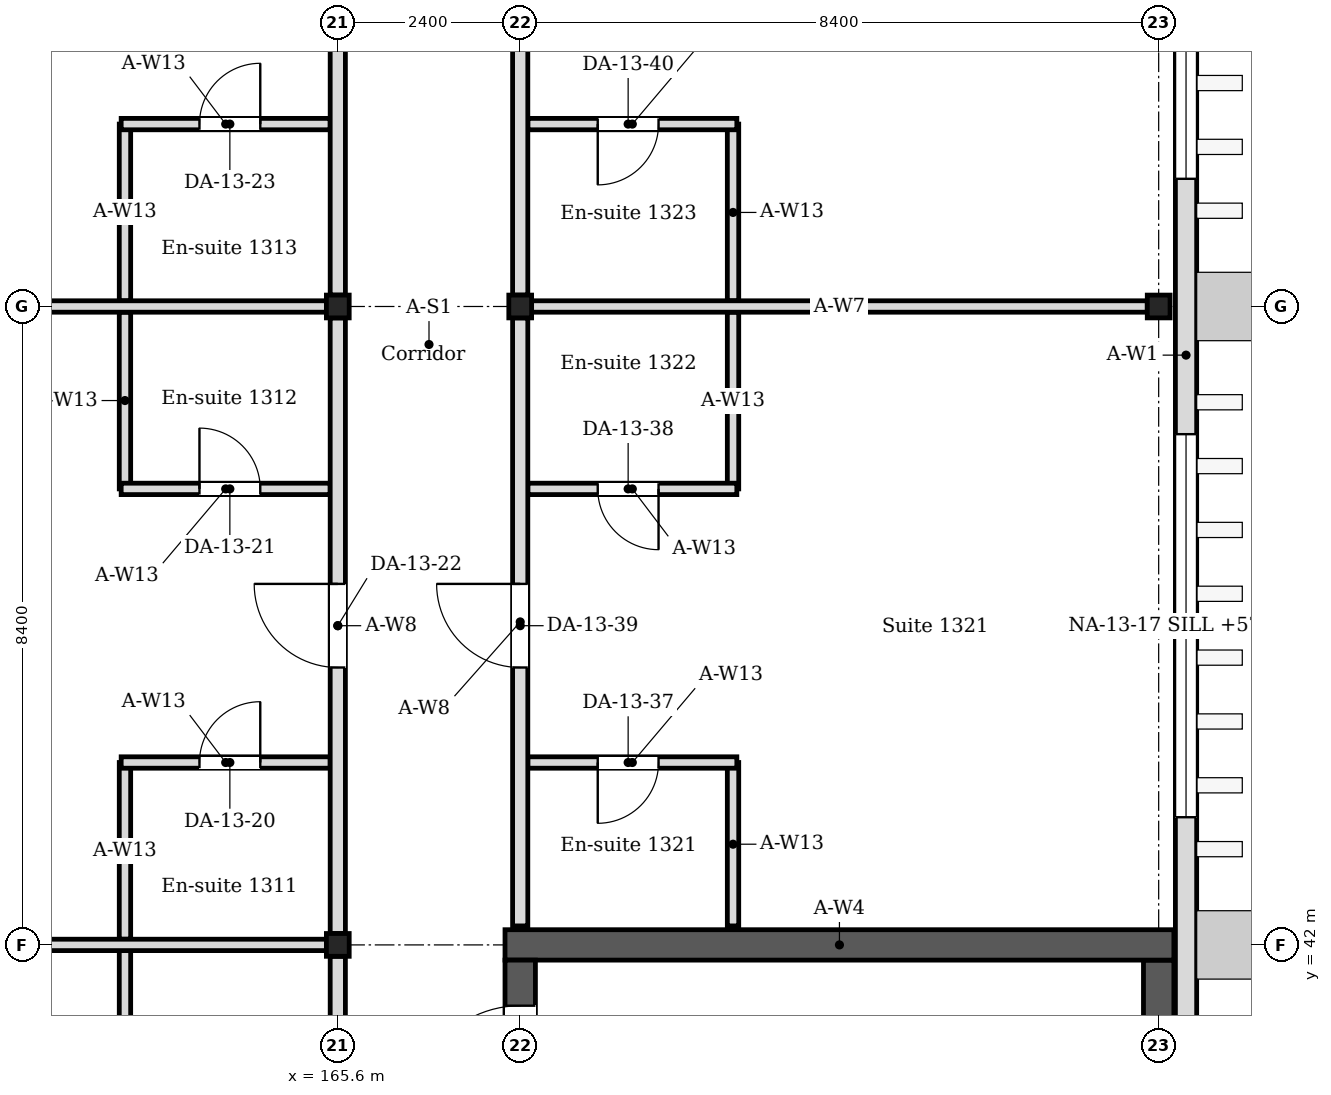
"""IFC4 building model, lengths in metres.
Left out: names, types, materials, properties, quantities, classifications, styles, units other than length and angle.
Written with IfcOpenShell. Run it as: python <this file> out.ifc"""

import sys

from ifc_helpers import new_model, si_unit, direction, frame, frame_2d, origin, origin_2d, place, context, subcontext, project, spatial, rectangle, i_section, extrude, element, fill, save


model = new_model("IFC4")
c1 = context("Model", 3, precision=1e-05, world=origin(), true_north=direction((0.0, 1.0)))
c2 = subcontext(c1, "Body", "Model", "MODEL_VIEW")
j1 = project(units=[si_unit("LENGTHUNIT", "METRE"), si_unit("PLANEANGLEUNIT", "RADIAN")], contexts=[c1])
p1 = place(None, origin())
s1 = spatial("IfcSite", under=j1, at=p1, CompositionType="ELEMENT")
p2 = place(p1, origin())
s2 = spatial("IfcBuilding", under=s1, at=p2, CompositionType="ELEMENT")
p3 = place(p2, frame((0.0, 0.0, 56.4)))
s3 = spatial("IfcBuildingStorey", under=s2, at=p3, CompositionType="ELEMENT", Elevation=56.4)
for number, where, z_axis, x_axis in (
    (1, (165.6, 42.0, 0.0), (0.0, 0.0, 1.0), (1.0, 0.0, 0.0)),
    (2, (165.6, 50.4, 0.0), (0.0, 0.0, 1.0), (1.0, 0.0, 0.0)),
    (3, (168.0, 50.4, 0.0), (0.0, 0.0, 1.0), (1.0, 0.0, 0.0)),
    (4, (176.4, 50.4, 0.0), (0.0, 0.0, 1.0), (1.0, 0.0, 0.0)),
):
    element("IfcColumn", number, at=place(p3, frame(where, z_axis=z_axis, x_axis=x_axis)), inside=s3, PredefinedType="COLUMN", context=c2, shape_type="SweptSolid", body=[
        extrude(i_section(OverallWidth=0.3, OverallDepth=0.3, WebThickness=0.01, FlangeThickness=0.015, FilletRadius=0.013, at=origin_2d()), origin(), (0.0, 0.0, 1.0), 4.2),
    ])
p4 = place(p3, frame((167.8, 42.0, 0.0), z_axis=(0.0, 0.0, 1.0), x_axis=(1.0, 0.0, 0.0)))
e5 = element("IfcWall", 5, at=p4, inside=s3, PredefinedType="SOLIDWALL", context=c2, shape_type="SweptSolid", body=[
    extrude(rectangle(XDim=8.8, YDim=0.4, at=frame_2d((4.4, 0.0))), origin(), (0.0, 0.0, 1.0), 4.05),
])
p5 = place(p3, frame((168.0, 25.4, 0.0), z_axis=(0.0, 0.0, 1.0), x_axis=(0.0, 1.0, 0.0)))
e6 = element("IfcWall", 6, at=p5, inside=s3, PredefinedType="SOLIDWALL", context=c2, shape_type="SweptSolid", body=[
    extrude(rectangle(XDim=16.4, YDim=0.4, at=frame_2d((8.2, 0.0))), origin(), (0.0, 0.0, 1.0), 4.05),
])
p6 = place(p5, frame((1.0, 0.0, 0.0)))
e7 = element("IfcOpeningElement", 7, at=p6, cuts=e6, PredefinedType="OPENING", context=c2, shape_type="SweptSolid", body=[
    extrude(rectangle(XDim=1.0, YDim=2.1, at=frame_2d((0.5, 1.05))), frame((0.0, 0.21, 0.0), z_axis=(0.0, -1.0, 0.0), x_axis=(1.0, 0.0, 0.0)), (0.0, 0.0, 1.0), 0.42),
])
p7 = place(p5, frame((14.4, 0.0, 0.0)))
e8 = element("IfcOpeningElement", 8, at=p7, cuts=e6, PredefinedType="OPENING", context=c2, shape_type="SweptSolid", body=[
    extrude(rectangle(XDim=1.4, YDim=2.1, at=frame_2d((0.7, 1.05))), frame((0.0, 0.21, 0.0), z_axis=(0.0, -1.0, 0.0), x_axis=(1.0, 0.0, 0.0)), (0.0, 0.0, 1.0), 0.42),
])
p8 = place(p3, frame((176.4, 25.4, 0.0), z_axis=(0.0, 0.0, 1.0), x_axis=(0.0, 1.0, 0.0)))
e9 = element("IfcWall", 9, at=p8, inside=s3, PredefinedType="SOLIDWALL", context=c2, shape_type="SweptSolid", body=[
    extrude(rectangle(XDim=16.4, YDim=0.4, at=frame_2d((8.2, 0.0))), origin(), (0.0, 0.0, 1.0), 4.05),
])
p9 = place(p3, frame((176.76, 24.85, 0.0), z_axis=(0.0, 0.0, 1.0), x_axis=(0.0, 1.0, 0.0)))
e10 = element("IfcWall", 10, at=p9, inside=s3, PredefinedType="SOLIDWALL", context=c2, shape_type="SweptSolid", body=[
    extrude(rectangle(XDim=42.57, YDim=0.28, at=frame_2d((21.285, 0.0))), origin(), (0.0, 0.0, 1.0), 4.05),
])
p10 = place(p9, frame((18.83, 0.0, 0.6)))
e11 = element("IfcOpeningElement", 11, at=p10, cuts=e10, PredefinedType="OPENING", context=c2, shape_type="SweptSolid", body=[
    extrude(rectangle(XDim=5.04, YDim=2.4, at=frame_2d((2.52, 1.2))), frame((0.0, 0.15, 0.0), z_axis=(0.0, -1.0, 0.0), x_axis=(1.0, 0.0, 0.0)), (0.0, 0.0, 1.0), 0.3),
])
p11 = place(p9, frame((27.23, 0.0, 0.6)))
e12 = element("IfcOpeningElement", 12, at=p11, cuts=e10, PredefinedType="OPENING", context=c2, shape_type="SweptSolid", body=[
    extrude(rectangle(XDim=5.04, YDim=2.4, at=frame_2d((2.52, 1.2))), frame((0.0, 0.15, 0.0), z_axis=(0.0, -1.0, 0.0), x_axis=(1.0, 0.0, 0.0)), (0.0, 0.0, 1.0), 0.3),
])
for number, where, z_axis, x_axis in (
    (13, (162.8, 39.6, 0.0), (0.0, 0.0, 1.0), (0.0, 1.0, 0.0)),
    (14, (162.8, 42.075, 0.0), (0.0, 0.0, 1.0), (0.0, 1.0, 0.0)),
):
    element("IfcWall", number, at=place(p3, frame(where, z_axis=z_axis, x_axis=x_axis)), inside=s3, PredefinedType="PARTITIONING", context=c2, shape_type="SweptSolid", body=[
        extrude(rectangle(XDim=2.325, YDim=0.15, at=frame_2d((1.163, 0.0))), origin(), (0.0, 0.0, 1.0), 4.05),
    ])
p12 = place(p3, frame((162.75, 44.4, 0.0), z_axis=(0.0, 0.0, 1.0), x_axis=(1.0, 0.0, 0.0)))
e15 = element("IfcWall", 15, at=p12, inside=s3, PredefinedType="PARTITIONING", context=c2, shape_type="SweptSolid", body=[
    extrude(rectangle(XDim=2.75, YDim=0.15, at=frame_2d((1.375, 0.0))), origin(), (0.0, 0.0, 1.0), 4.05),
])
p13 = place(p12, frame((1.03, 0.0, 0.0)))
e16 = element("IfcOpeningElement", 16, at=p13, cuts=e15, PredefinedType="OPENING", context=c2, shape_type="SweptSolid", body=[
    extrude(rectangle(XDim=0.8, YDim=2.1, at=frame_2d((0.4, 1.05))), frame((0.0, 0.085, 0.0), z_axis=(0.0, -1.0, 0.0), x_axis=(1.0, 0.0, 0.0)), (0.0, 0.0, 1.0), 0.17),
])
p14 = place(p3, frame((162.8, 48.0, 0.0), z_axis=(0.0, 0.0, 1.0), x_axis=(0.0, 1.0, 0.0)))
e17 = element("IfcWall", 17, at=p14, inside=s3, PredefinedType="PARTITIONING", context=c2, shape_type="SweptSolid", body=[
    extrude(rectangle(XDim=2.325, YDim=0.15, at=frame_2d((1.163, 0.0))), origin(), (0.0, 0.0, 1.0), 4.05),
])
p15 = place(p3, frame((162.75, 48.0, 0.0), z_axis=(0.0, 0.0, 1.0), x_axis=(1.0, 0.0, 0.0)))
e18 = element("IfcWall", 18, at=p15, inside=s3, PredefinedType="PARTITIONING", context=c2, shape_type="SweptSolid", body=[
    extrude(rectangle(XDim=2.75, YDim=0.15, at=frame_2d((1.375, 0.0))), origin(), (0.0, 0.0, 1.0), 4.05),
])
p16 = place(p15, frame((1.03, 0.0, 0.0)))
e19 = element("IfcOpeningElement", 19, at=p16, cuts=e18, PredefinedType="OPENING", context=c2, shape_type="SweptSolid", body=[
    extrude(rectangle(XDim=0.8, YDim=2.1, at=frame_2d((0.4, 1.05))), frame((0.0, 0.085, 0.0), z_axis=(0.0, -1.0, 0.0), x_axis=(1.0, 0.0, 0.0)), (0.0, 0.0, 1.0), 0.17),
])
p17 = place(p3, frame((162.8, 50.475, 0.0), z_axis=(0.0, 0.0, 1.0), x_axis=(0.0, 1.0, 0.0)))
e20 = element("IfcWall", 20, at=p17, inside=s3, PredefinedType="PARTITIONING", context=c2, shape_type="SweptSolid", body=[
    extrude(rectangle(XDim=2.325, YDim=0.15, at=frame_2d((1.163, 0.0))), origin(), (0.0, 0.0, 1.0), 4.05),
])
p18 = place(p3, frame((162.75, 52.8, 0.0), z_axis=(0.0, 0.0, 1.0), x_axis=(1.0, 0.0, 0.0)))
e21 = element("IfcWall", 21, at=p18, inside=s3, PredefinedType="PARTITIONING", context=c2, shape_type="SweptSolid", body=[
    extrude(rectangle(XDim=2.75, YDim=0.15, at=frame_2d((1.375, 0.0))), origin(), (0.0, 0.0, 1.0), 4.05),
])
p19 = place(p18, frame((1.03, 0.0, 0.0)))
e22 = element("IfcOpeningElement", 22, at=p19, cuts=e21, PredefinedType="OPENING", context=c2, shape_type="SweptSolid", body=[
    extrude(rectangle(XDim=0.8, YDim=2.1, at=frame_2d((0.4, 1.05))), frame((0.0, 0.085, 0.0), z_axis=(0.0, -1.0, 0.0), x_axis=(1.0, 0.0, 0.0)), (0.0, 0.0, 1.0), 0.17),
])
p20 = place(p3, frame((170.8, 42.25, 0.0), z_axis=(0.0, 0.0, 1.0), x_axis=(0.0, 1.0, 0.0)))
e23 = element("IfcWall", 23, at=p20, inside=s3, PredefinedType="PARTITIONING", context=c2, shape_type="SweptSolid", body=[
    extrude(rectangle(XDim=2.15, YDim=0.15, at=frame_2d((1.075, 0.0))), origin(), (0.0, 0.0, 1.0), 4.05),
])
p21 = place(p3, frame((170.85, 44.4, 0.0), z_axis=(0.0, 0.0, 1.0), x_axis=(-1.0, 0.0, 0.0)))
e24 = element("IfcWall", 24, at=p21, inside=s3, PredefinedType="PARTITIONING", context=c2, shape_type="SweptSolid", body=[
    extrude(rectangle(XDim=2.75, YDim=0.15, at=frame_2d((1.375, 0.0))), origin(), (0.0, 0.0, 1.0), 4.05),
])
p22 = place(p21, frame((1.03, 0.0, 0.0)))
e25 = element("IfcOpeningElement", 25, at=p22, cuts=e24, PredefinedType="OPENING", context=c2, shape_type="SweptSolid", body=[
    extrude(rectangle(XDim=0.8, YDim=2.1, at=frame_2d((0.4, 1.05))), frame((0.0, 0.085, 0.0), z_axis=(0.0, -1.0, 0.0), x_axis=(1.0, 0.0, 0.0)), (0.0, 0.0, 1.0), 0.17),
])
p23 = place(p3, frame((170.8, 48.0, 0.0), z_axis=(0.0, 0.0, 1.0), x_axis=(0.0, 1.0, 0.0)))
e26 = element("IfcWall", 26, at=p23, inside=s3, PredefinedType="PARTITIONING", context=c2, shape_type="SweptSolid", body=[
    extrude(rectangle(XDim=2.325, YDim=0.15, at=frame_2d((1.163, 0.0))), origin(), (0.0, 0.0, 1.0), 4.05),
])
p24 = place(p3, frame((170.85, 48.0, 0.0), z_axis=(0.0, 0.0, 1.0), x_axis=(-1.0, 0.0, 0.0)))
e27 = element("IfcWall", 27, at=p24, inside=s3, PredefinedType="PARTITIONING", context=c2, shape_type="SweptSolid", body=[
    extrude(rectangle(XDim=2.75, YDim=0.15, at=frame_2d((1.375, 0.0))), origin(), (0.0, 0.0, 1.0), 4.05),
])
p25 = place(p24, frame((1.03, 0.0, 0.0)))
e28 = element("IfcOpeningElement", 28, at=p25, cuts=e27, PredefinedType="OPENING", context=c2, shape_type="SweptSolid", body=[
    extrude(rectangle(XDim=0.8, YDim=2.1, at=frame_2d((0.4, 1.05))), frame((0.0, 0.085, 0.0), z_axis=(0.0, -1.0, 0.0), x_axis=(1.0, 0.0, 0.0)), (0.0, 0.0, 1.0), 0.17),
])
p26 = place(p3, frame((170.8, 50.475, 0.0), z_axis=(0.0, 0.0, 1.0), x_axis=(0.0, 1.0, 0.0)))
e29 = element("IfcWall", 29, at=p26, inside=s3, PredefinedType="PARTITIONING", context=c2, shape_type="SweptSolid", body=[
    extrude(rectangle(XDim=2.325, YDim=0.15, at=frame_2d((1.163, 0.0))), origin(), (0.0, 0.0, 1.0), 4.05),
])
p27 = place(p3, frame((170.85, 52.8, 0.0), z_axis=(0.0, 0.0, 1.0), x_axis=(-1.0, 0.0, 0.0)))
e30 = element("IfcWall", 30, at=p27, inside=s3, PredefinedType="PARTITIONING", context=c2, shape_type="SweptSolid", body=[
    extrude(rectangle(XDim=2.75, YDim=0.15, at=frame_2d((1.375, 0.0))), origin(), (0.0, 0.0, 1.0), 4.05),
])
p28 = place(p27, frame((1.03, 0.0, 0.0)))
e31 = element("IfcOpeningElement", 31, at=p28, cuts=e30, PredefinedType="OPENING", context=c2, shape_type="SweptSolid", body=[
    extrude(rectangle(XDim=0.8, YDim=2.1, at=frame_2d((0.4, 1.05))), frame((0.0, 0.085, 0.0), z_axis=(0.0, -1.0, 0.0), x_axis=(1.0, 0.0, 0.0)), (0.0, 0.0, 1.0), 0.17),
])
for number, where, z_axis, x_axis in (
    (32, (157.35, 42.0, 0.0), (0.0, 0.0, 1.0), (1.0, 0.0, 0.0)),
    (33, (157.35, 50.4, 0.0), (0.0, 0.0, 1.0), (1.0, 0.0, 0.0)),
):
    element("IfcWall", number, at=place(p3, frame(where, z_axis=z_axis, x_axis=x_axis)), inside=s3, PredefinedType="PARTITIONING", context=c2, shape_type="SweptSolid", body=[
        extrude(rectangle(XDim=8.1, YDim=0.15, at=frame_2d((4.05, 0.0))), origin(), (0.0, 0.0, 1.0), 3.604),
    ])
p29 = place(p3, frame((168.15, 50.4, 0.0), z_axis=(0.0, 0.0, 1.0), x_axis=(1.0, 0.0, 0.0)))
e34 = element("IfcWall", 34, at=p29, inside=s3, PredefinedType="PARTITIONING", context=c2, shape_type="SweptSolid", body=[
    extrude(rectangle(XDim=8.1, YDim=0.15, at=frame_2d((4.05, 0.0))), origin(), (0.0, 0.0, 1.0), 3.604),
])
p30 = place(p3, frame((165.6, 33.75, 0.0), z_axis=(0.0, 0.0, 1.0), x_axis=(0.0, 1.0, 0.0)))
e35 = element("IfcWall", 35, at=p30, inside=s3, PredefinedType="PARTITIONING", context=c2, shape_type="SweptSolid", body=[
    extrude(rectangle(XDim=8.1, YDim=0.2, at=frame_2d((4.05, 0.0))), origin(), (0.0, 0.0, 1.0), 3.45),
])
p31 = place(p30, frame((2.775, 0.0, 0.0)))
e36 = element("IfcOpeningElement", 36, at=p31, cuts=e35, PredefinedType="OPENING", context=c2, shape_type="SweptSolid", body=[
    extrude(rectangle(XDim=1.15, YDim=2.1, at=frame_2d((0.575, 1.05))), frame((0.0, 0.11, 0.0), z_axis=(0.0, -1.0, 0.0), x_axis=(1.0, 0.0, 0.0)), (0.0, 0.0, 1.0), 0.22),
])
p32 = place(p30, frame((4.45, 0.0, 0.0)))
e37 = element("IfcOpeningElement", 37, at=p32, cuts=e35, PredefinedType="OPENING", context=c2, shape_type="SweptSolid", body=[
    extrude(rectangle(XDim=1.0, YDim=2.4, at=frame_2d((0.5, 1.2))), frame((0.0, 0.11, 0.0), z_axis=(0.0, -1.0, 0.0), x_axis=(1.0, 0.0, 0.0)), (0.0, 0.0, 1.0), 0.22),
])
p33 = place(p3, frame((165.6, 42.15, 0.0), z_axis=(0.0, 0.0, 1.0), x_axis=(0.0, 1.0, 0.0)))
e38 = element("IfcWall", 38, at=p33, inside=s3, PredefinedType="PARTITIONING", context=c2, shape_type="SweptSolid", body=[
    extrude(rectangle(XDim=8.1, YDim=0.2, at=frame_2d((4.05, 0.0))), origin(), (0.0, 0.0, 1.0), 3.45),
])
p34 = place(p33, frame((3.5, 0.0, 0.0)))
e39 = element("IfcOpeningElement", 39, at=p34, cuts=e38, PredefinedType="OPENING", context=c2, shape_type="SweptSolid", body=[
    extrude(rectangle(XDim=1.1, YDim=2.4, at=frame_2d((0.55, 1.2))), frame((0.0, 0.11, 0.0), z_axis=(0.0, -1.0, 0.0), x_axis=(1.0, 0.0, 0.0)), (0.0, 0.0, 1.0), 0.22),
])
p35 = place(p3, frame((165.6, 50.55, 0.0), z_axis=(0.0, 0.0, 1.0), x_axis=(0.0, 1.0, 0.0)))
e40 = element("IfcWall", 40, at=p35, inside=s3, PredefinedType="PARTITIONING", context=c2, shape_type="SweptSolid", body=[
    extrude(rectangle(XDim=8.1, YDim=0.2, at=frame_2d((4.05, 0.0))), origin(), (0.0, 0.0, 1.0), 3.45),
])
p36 = place(p35, frame((3.5, 0.0, 0.0)))
e41 = element("IfcOpeningElement", 41, at=p36, cuts=e40, PredefinedType="OPENING", context=c2, shape_type="SweptSolid", body=[
    extrude(rectangle(XDim=1.1, YDim=2.4, at=frame_2d((0.55, 1.2))), frame((0.0, 0.11, 0.0), z_axis=(0.0, -1.0, 0.0), x_axis=(1.0, 0.0, 0.0)), (0.0, 0.0, 1.0), 0.22),
])
p37 = place(p3, frame((168.0, 42.25, 0.0), z_axis=(0.0, 0.0, 1.0), x_axis=(0.0, 1.0, 0.0)))
e42 = element("IfcWall", 42, at=p37, inside=s3, PredefinedType="PARTITIONING", context=c2, shape_type="SweptSolid", body=[
    extrude(rectangle(XDim=8.0, YDim=0.2, at=frame_2d((4.0, 0.0))), origin(), (0.0, 0.0, 1.0), 3.45),
])
p38 = place(p37, frame((3.4, 0.0, 0.0)))
e43 = element("IfcOpeningElement", 43, at=p38, cuts=e42, PredefinedType="OPENING", context=c2, shape_type="SweptSolid", body=[
    extrude(rectangle(XDim=1.1, YDim=2.4, at=frame_2d((0.55, 1.2))), frame((0.0, 0.11, 0.0), z_axis=(0.0, -1.0, 0.0), x_axis=(1.0, 0.0, 0.0)), (0.0, 0.0, 1.0), 0.22),
])
p39 = place(p3, frame((168.0, 50.55, 0.0), z_axis=(0.0, 0.0, 1.0), x_axis=(0.0, 1.0, 0.0)))
e44 = element("IfcWall", 44, at=p39, inside=s3, PredefinedType="PARTITIONING", context=c2, shape_type="SweptSolid", body=[
    extrude(rectangle(XDim=8.05, YDim=0.2, at=frame_2d((4.025, 0.0))), origin(), (0.0, 0.0, 1.0), 3.45),
])
p40 = place(p39, frame((3.5, 0.0, 0.0)))
e45 = element("IfcOpeningElement", 45, at=p40, cuts=e44, PredefinedType="OPENING", context=c2, shape_type="SweptSolid", body=[
    extrude(rectangle(XDim=1.1, YDim=2.4, at=frame_2d((0.55, 1.2))), frame((0.0, 0.11, 0.0), z_axis=(0.0, -1.0, 0.0), x_axis=(1.0, 0.0, 0.0)), (0.0, 0.0, 1.0), 0.22),
])
p41 = place(p10, origin())
e46 = element("IfcWindow", 46, at=p41, inside=s3, PartitioningType="SINGLE_PANEL", PredefinedType="WINDOW", context=c2, shape_type="SweptSolid", body=[
    extrude(rectangle(XDim=5.04, YDim=2.4, at=frame_2d((2.52, 1.2))), frame((0.0, 0.03, 0.0), z_axis=(0.0, -1.0, 0.0), x_axis=(1.0, 0.0, 0.0)), (0.0, 0.0, 1.0), 0.06),
])
fill(e11, e46)
p42 = place(p11, origin())
e47 = element("IfcWindow", 47, at=p42, inside=s3, PartitioningType="SINGLE_PANEL", PredefinedType="WINDOW", context=c2, shape_type="SweptSolid", body=[
    extrude(rectangle(XDim=5.04, YDim=2.4, at=frame_2d((2.52, 1.2))), frame((0.0, 0.03, 0.0), z_axis=(0.0, -1.0, 0.0), x_axis=(1.0, 0.0, 0.0)), (0.0, 0.0, 1.0), 0.06),
])
fill(e12, e47)
p43 = place(p13, origin())
e48 = element("IfcDoor", 48, at=p43, inside=s3, OperationType="SINGLE_SWING_RIGHT", PredefinedType="DOOR", context=c2, shape_type="SweptSolid", body=[
    extrude(rectangle(XDim=0.8, YDim=2.1, at=frame_2d((0.4, 1.05))), frame((0.0, 0.025, 0.0), z_axis=(0.0, -1.0, 0.0), x_axis=(1.0, 0.0, 0.0)), (0.0, 0.0, 1.0), 0.05),
])
fill(e16, e48)
p44 = place(p16, origin())
e49 = element("IfcDoor", 49, at=p44, inside=s3, OperationType="SINGLE_SWING_LEFT", PredefinedType="DOOR", context=c2, shape_type="SweptSolid", body=[
    extrude(rectangle(XDim=0.8, YDim=2.1, at=frame_2d((0.4, 1.05))), frame((0.0, 0.025, 0.0), z_axis=(0.0, -1.0, 0.0), x_axis=(1.0, 0.0, 0.0)), (0.0, 0.0, 1.0), 0.05),
])
fill(e19, e49)
p45 = place(p34, origin())
e50 = element("IfcDoor", 50, at=p45, inside=s3, OperationType="SINGLE_SWING_RIGHT", PredefinedType="DOOR", context=c2, shape_type="SweptSolid", body=[
    extrude(rectangle(XDim=1.1, YDim=2.4, at=frame_2d((0.55, 1.2))), frame((0.0, 0.025, 0.0), z_axis=(0.0, -1.0, 0.0), x_axis=(1.0, 0.0, 0.0)), (0.0, 0.0, 1.0), 0.05),
])
fill(e39, e50)
p46 = place(p19, origin())
e51 = element("IfcDoor", 51, at=p46, inside=s3, OperationType="SINGLE_SWING_RIGHT", PredefinedType="DOOR", context=c2, shape_type="SweptSolid", body=[
    extrude(rectangle(XDim=0.8, YDim=2.1, at=frame_2d((0.4, 1.05))), frame((0.0, 0.025, 0.0), z_axis=(0.0, -1.0, 0.0), x_axis=(1.0, 0.0, 0.0)), (0.0, 0.0, 1.0), 0.05),
])
fill(e22, e51)
p47 = place(p22, origin())
e52 = element("IfcDoor", 52, at=p47, inside=s3, OperationType="SINGLE_SWING_RIGHT", PredefinedType="DOOR", context=c2, shape_type="SweptSolid", body=[
    extrude(rectangle(XDim=0.8, YDim=2.1, at=frame_2d((0.4, 1.05))), frame((0.0, 0.025, 0.0), z_axis=(0.0, -1.0, 0.0), x_axis=(1.0, 0.0, 0.0)), (0.0, 0.0, 1.0), 0.05),
])
fill(e25, e52)
p48 = place(p25, origin())
e53 = element("IfcDoor", 53, at=p48, inside=s3, OperationType="SINGLE_SWING_LEFT", PredefinedType="DOOR", context=c2, shape_type="SweptSolid", body=[
    extrude(rectangle(XDim=0.8, YDim=2.1, at=frame_2d((0.4, 1.05))), frame((0.0, 0.025, 0.0), z_axis=(0.0, -1.0, 0.0), x_axis=(1.0, 0.0, 0.0)), (0.0, 0.0, 1.0), 0.05),
])
fill(e28, e53)
p49 = place(p38, origin())
e54 = element("IfcDoor", 54, at=p49, inside=s3, OperationType="SINGLE_SWING_RIGHT", PredefinedType="DOOR", context=c2, shape_type="SweptSolid", body=[
    extrude(rectangle(XDim=1.1, YDim=2.4, at=frame_2d((0.55, 1.2))), frame((0.0, 0.025, 0.0), z_axis=(0.0, -1.0, 0.0), x_axis=(1.0, 0.0, 0.0)), (0.0, 0.0, 1.0), 0.05),
])
fill(e43, e54)
p50 = place(p28, origin())
e55 = element("IfcDoor", 55, at=p50, inside=s3, OperationType="SINGLE_SWING_RIGHT", PredefinedType="DOOR", context=c2, shape_type="SweptSolid", body=[
    extrude(rectangle(XDim=0.8, YDim=2.1, at=frame_2d((0.4, 1.05))), frame((0.0, 0.025, 0.0), z_axis=(0.0, -1.0, 0.0), x_axis=(1.0, 0.0, 0.0)), (0.0, 0.0, 1.0), 0.05),
])
fill(e31, e55)
p51 = place(p7, origin())
e56 = element("IfcDoor", 56, at=p51, inside=s3, OperationType="DOUBLE_DOOR_DOUBLE_SWING", PredefinedType="DOOR", context=c2, shape_type="SweptSolid", body=[
    extrude(rectangle(XDim=1.4, YDim=2.1, at=frame_2d((0.7, 1.05))), frame((0.0, 0.025, 0.0), z_axis=(0.0, -1.0, 0.0), x_axis=(1.0, 0.0, 0.0)), (0.0, 0.0, 1.0), 0.05),
])
fill(e8, e56)
save(model, sys.argv[1])
